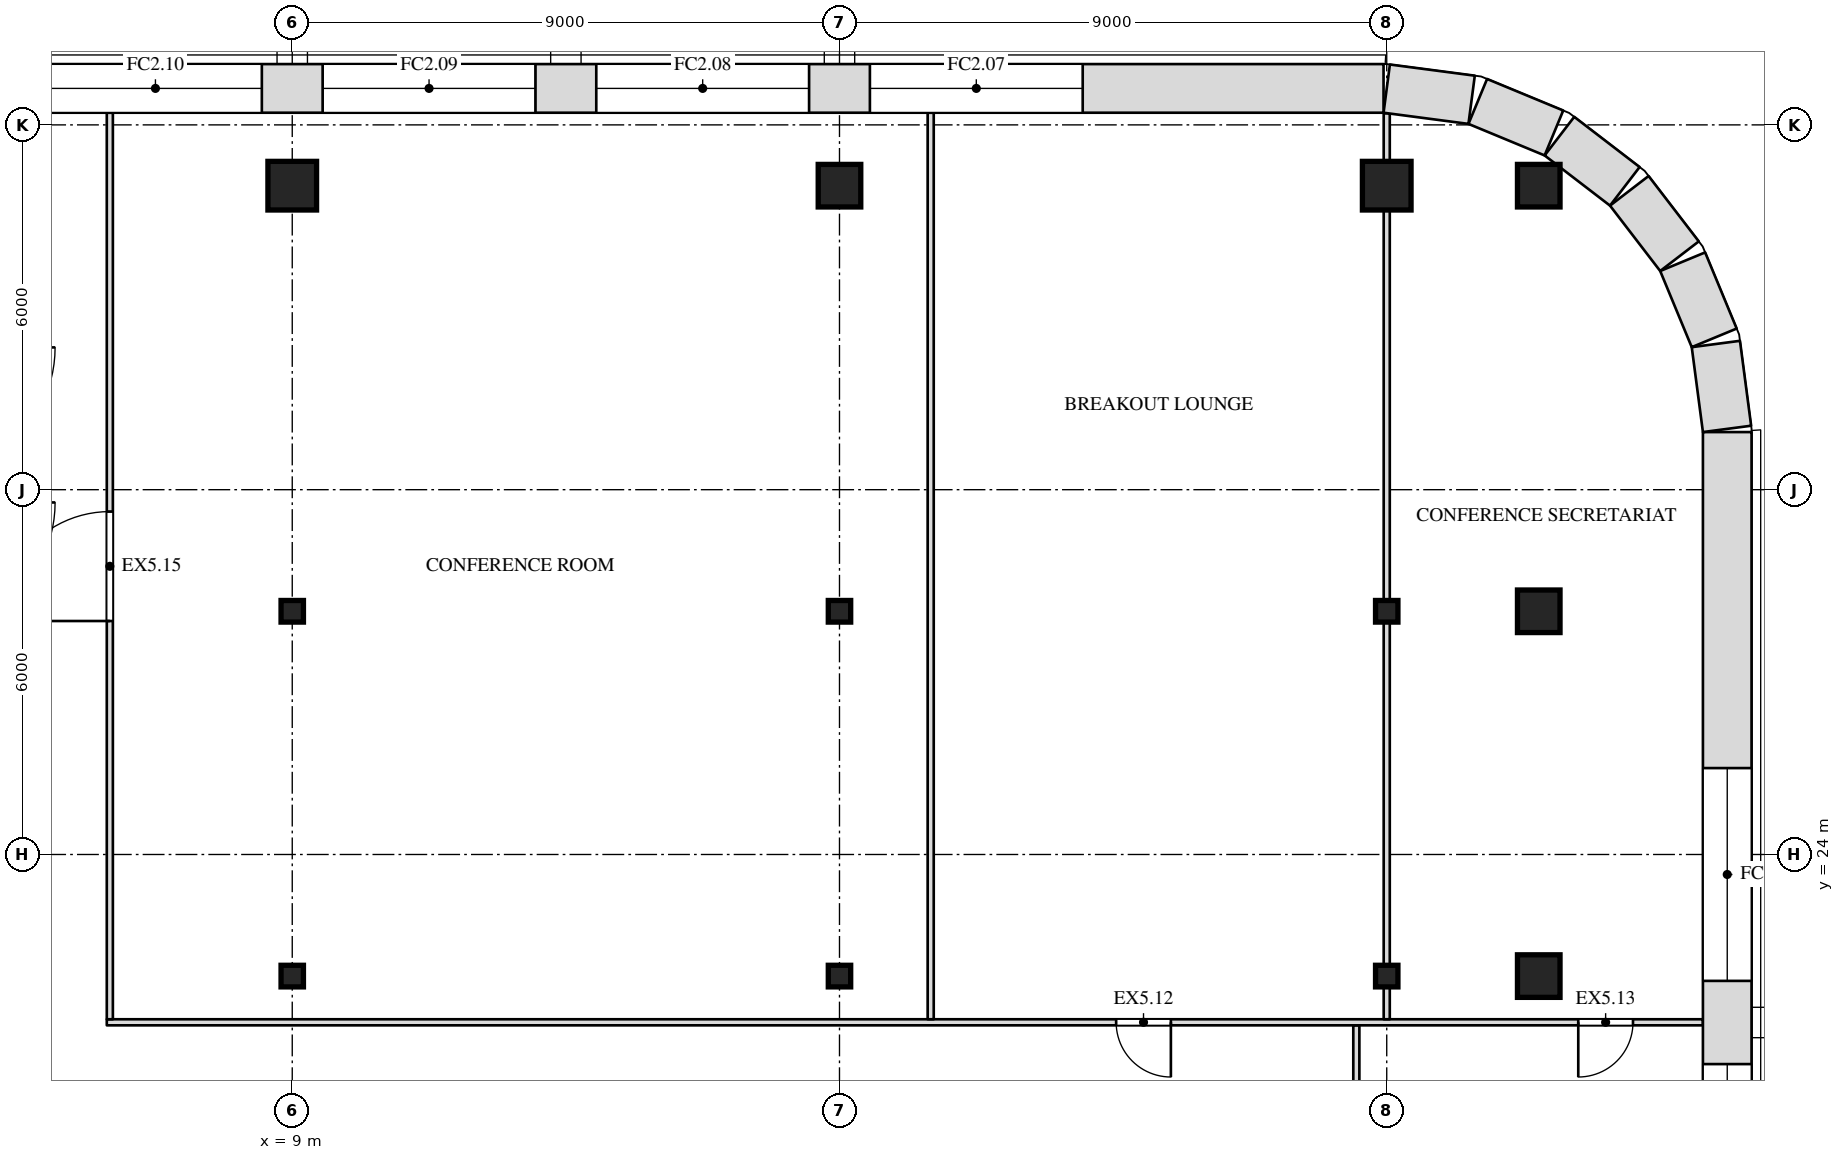
"""IFC4 building model, lengths in metres.
Left out: names, types, materials, properties, quantities, classifications, styles, units other than length and angle.
Written with IfcOpenShell. Run it as: python <this file> out.ifc"""

import sys

from ifc_helpers import new_model, si_unit, direction, frame, frame_2d, origin, origin_2d, place, context, subcontext, project, spatial, rectangle, i_section, extrude, element, fill, save


model = new_model("IFC4")
c1 = context("Model", 3, precision=1e-05, world=origin(), true_north=direction((0.0, 1.0)))
c2 = subcontext(c1, "Body", "Model", "MODEL_VIEW")
j1 = project(units=[si_unit("LENGTHUNIT", "METRE"), si_unit("PLANEANGLEUNIT", "RADIAN")], contexts=[c1])
p1 = place(None, origin())
s1 = spatial("IfcSite", under=j1, at=p1, CompositionType="ELEMENT")
p2 = place(p1, origin())
s2 = spatial("IfcBuilding", under=s1, at=p2, CompositionType="ELEMENT")
p3 = place(p2, frame((0.0, 0.0, 288.5)))
s3 = spatial("IfcBuildingStorey", under=s2, at=p3, CompositionType="ELEMENT", Elevation=288.5)
for number, where, z_axis, x_axis in (
    (1, (9.0, 22.0, 0.0), (0.0, 0.0, 1.0), (1.0, 0.0, 0.0)),
    (2, (18.0, 22.0, 0.0), (0.0, 0.0, 1.0), (1.0, 0.0, 0.0)),
    (3, (27.0, 22.0, 0.0), (0.0, 0.0, 1.0), (1.0, 0.0, 0.0)),
):
    element("IfcColumn", number, at=place(p3, frame(where, z_axis=z_axis, x_axis=x_axis)), inside=s3, PredefinedType="COLUMN", context=c2, shape_type="SweptSolid", body=[
        extrude(i_section(OverallWidth=0.368, OverallDepth=0.356, WebThickness=0.011, FlangeThickness=0.018, at=origin_2d()), origin(), (0.0, 0.0, 1.0), 4.0),
    ])
p4 = place(p3, frame((29.5, 22.0, 0.0), z_axis=(0.0, 0.0, 1.0), x_axis=(1.0, 0.0, 0.0)))
e4 = element("IfcColumn", 4, at=p4, inside=s3, PredefinedType="COLUMN", context=c2, shape_type="SweptSolid", body=[
    extrude(rectangle(XDim=0.7, YDim=0.7, at=origin_2d()), origin(), (0.0, 0.0, 1.0), 4.0),
])
for number, where, z_axis, x_axis in (
    (5, (9.0, 28.0, 0.0), (0.0, 0.0, 1.0), (1.0, 0.0, 0.0)),
    (6, (18.0, 28.0, 0.0), (0.0, 0.0, 1.0), (1.0, 0.0, 0.0)),
    (7, (27.0, 28.0, 0.0), (0.0, 0.0, 1.0), (1.0, 0.0, 0.0)),
):
    element("IfcColumn", number, at=place(p3, frame(where, z_axis=z_axis, x_axis=x_axis)), inside=s3, PredefinedType="COLUMN", context=c2, shape_type="SweptSolid", body=[
        extrude(i_section(OverallWidth=0.368, OverallDepth=0.356, WebThickness=0.011, FlangeThickness=0.018, at=origin_2d()), origin(), (0.0, 0.0, 1.0), 4.0),
    ])
p5 = place(p3, frame((29.5, 28.0, 0.0), z_axis=(0.0, 0.0, 1.0), x_axis=(1.0, 0.0, 0.0)))
e8 = element("IfcColumn", 8, at=p5, inside=s3, PredefinedType="COLUMN", context=c2, shape_type="SweptSolid", body=[
    extrude(rectangle(XDim=0.7, YDim=0.7, at=origin_2d()), origin(), (0.0, 0.0, 1.0), 4.0),
])
p6 = place(p3, frame((9.0, 35.0, 0.0), z_axis=(0.0, 0.0, 1.0), x_axis=(1.0, 0.0, 0.0)))
e9 = element("IfcColumn", 9, at=p6, inside=s3, PredefinedType="COLUMN", context=c2, shape_type="SweptSolid", body=[
    extrude(rectangle(XDim=0.8, YDim=0.8, at=origin_2d()), origin(), (0.0, 0.0, 1.0), 4.0),
])
p7 = place(p3, frame((18.0, 35.0, 0.0), z_axis=(0.0, 0.0, 1.0), x_axis=(1.0, 0.0, 0.0)))
e10 = element("IfcColumn", 10, at=p7, inside=s3, PredefinedType="COLUMN", context=c2, shape_type="SweptSolid", body=[
    extrude(rectangle(XDim=0.7, YDim=0.7, at=origin_2d()), origin(), (0.0, 0.0, 1.0), 4.0),
])
p8 = place(p3, frame((27.0, 35.0, 0.0), z_axis=(0.0, 0.0, 1.0), x_axis=(1.0, 0.0, 0.0)))
e11 = element("IfcColumn", 11, at=p8, inside=s3, PredefinedType="COLUMN", context=c2, shape_type="SweptSolid", body=[
    extrude(rectangle(XDim=0.8, YDim=0.8, at=origin_2d()), origin(), (0.0, 0.0, 1.0), 4.0),
])
p9 = place(p3, frame((29.5, 35.0, 0.0), z_axis=(0.0, 0.0, 1.0), x_axis=(1.0, 0.0, 0.0)))
e12 = element("IfcColumn", 12, at=p9, inside=s3, PredefinedType="COLUMN", context=c2, shape_type="SweptSolid", body=[
    extrude(rectangle(XDim=0.7, YDim=0.7, at=origin_2d()), origin(), (0.0, 0.0, 1.0), 4.0),
])
p10 = place(p3, frame((26.5, -2.0, 0.0), z_axis=(0.0, 0.0, 1.0), x_axis=(0.0, 1.0, 0.0)))
e13 = element("IfcWall", 13, at=p10, inside=s3, PredefinedType="PARTITIONING", context=c2, shape_type="SweptSolid", body=[
    extrude(rectangle(XDim=23.19, YDim=0.1, at=frame_2d((11.595, 0.0))), origin(), (0.0, 0.0, 1.0), 3.78),
])
p11 = place(p3, frame((5.95, 21.24, 0.0), z_axis=(0.0, 0.0, 1.0), x_axis=(1.0, 0.0, 0.0)))
e14 = element("IfcWall", 14, at=p11, inside=s3, PredefinedType="PARTITIONING", context=c2, shape_type="SweptSolid", body=[
    extrude(rectangle(XDim=26.25, YDim=0.1, at=frame_2d((13.125, 0.0))), origin(), (0.0, 0.0, 1.0), 3.78),
])
p12 = place(p11, frame((16.6, 0.0, 0.0)))
e15 = element("IfcOpeningElement", 15, at=p12, cuts=e14, PredefinedType="OPENING", context=c2, shape_type="SweptSolid", body=[
    extrude(rectangle(XDim=0.9, YDim=2.1, at=frame_2d((0.45, 1.05))), frame((0.0, 0.062, 0.0), z_axis=(0.0, -1.0, 0.0), x_axis=(1.0, 0.0, 0.0)), (0.0, 0.0, 1.0), 0.124),
])
p13 = place(p11, frame((24.2, 0.0, 0.0)))
e16 = element("IfcOpeningElement", 16, at=p13, cuts=e14, PredefinedType="OPENING", context=c2, shape_type="SweptSolid", body=[
    extrude(rectangle(XDim=0.9, YDim=2.1, at=frame_2d((0.45, 1.05))), frame((0.0, 0.062, 0.0), z_axis=(0.0, -1.0, 0.0), x_axis=(1.0, 0.0, 0.0)), (0.0, 0.0, 1.0), 0.124),
])
p14 = place(p3, frame((6.0, 21.29, 0.0), z_axis=(0.0, 0.0, 1.0), x_axis=(0.0, 1.0, 0.0)))
e17 = element("IfcWall", 17, at=p14, inside=s3, PredefinedType="PARTITIONING", context=c2, shape_type="SweptSolid", body=[
    extrude(rectangle(XDim=14.91, YDim=0.1, at=frame_2d((7.455, 0.0))), origin(), (0.0, 0.0, 1.0), 3.78),
])
p15 = place(p14, frame((6.55, 0.0, 0.0)))
e18 = element("IfcOpeningElement", 18, at=p15, cuts=e17, PredefinedType="OPENING", context=c2, shape_type="SweptSolid", body=[
    extrude(rectangle(XDim=1.8, YDim=2.1, at=frame_2d((0.9, 1.05))), frame((0.0, 0.062, 0.0), z_axis=(0.0, -1.0, 0.0), x_axis=(1.0, 0.0, 0.0)), (0.0, 0.0, 1.0), 0.124),
])
p16 = place(p3, frame((19.5, 21.29, 0.0), z_axis=(0.0, 0.0, 1.0), x_axis=(0.0, 1.0, 0.0)))
e19 = element("IfcWall", 19, at=p16, inside=s3, PredefinedType="PARTITIONING", context=c2, shape_type="SweptSolid", body=[
    extrude(rectangle(XDim=14.91, YDim=0.1, at=frame_2d((7.455, 0.0))), origin(), (0.0, 0.0, 1.0), 3.78),
])
p17 = place(p3, frame((27.0, 21.29, 0.0), z_axis=(0.0, 0.0, 1.0), x_axis=(0.0, 1.0, 0.0)))
e20 = element("IfcWall", 20, at=p17, inside=s3, PredefinedType="PARTITIONING", context=c2, shape_type="SweptSolid", body=[
    extrude(rectangle(XDim=0.532, YDim=0.1, at=frame_2d((0.266, 0.0))), origin(), (0.0, 0.0, 1.0), 3.247),
])
p18 = place(p3, frame((27.0, 22.178, 0.0), z_axis=(0.0, 0.0, 1.0), x_axis=(0.0, 1.0, 0.0)))
e21 = element("IfcWall", 21, at=p18, inside=s3, PredefinedType="PARTITIONING", context=c2, shape_type="SweptSolid", body=[
    extrude(rectangle(XDim=5.645, YDim=0.1, at=frame_2d((2.822, 0.0))), origin(), (0.0, 0.0, 1.0), 3.247),
])
p19 = place(p3, frame((27.0, 28.178, 0.0), z_axis=(0.0, 0.0, 1.0), x_axis=(0.0, 1.0, 0.0)))
e22 = element("IfcWall", 22, at=p19, inside=s3, PredefinedType="PARTITIONING", context=c2, shape_type="SweptSolid", body=[
    extrude(rectangle(XDim=6.422, YDim=0.1, at=frame_2d((3.211, 0.0))), origin(), (0.0, 0.0, 1.0), 3.247),
])
p20 = place(p3, frame((27.0, 35.4, 0.0), z_axis=(0.0, 0.0, 1.0), x_axis=(0.0, 1.0, 0.0)))
e23 = element("IfcWall", 23, at=p20, inside=s3, PredefinedType="PARTITIONING", context=c2, shape_type="SweptSolid", body=[
    extrude(rectangle(XDim=0.79, YDim=0.1, at=frame_2d((0.395, 0.0))), origin(), (0.0, 0.0, 1.0), 3.78),
])
p21 = place(p3, frame((32.6, -7.948, 0.0), z_axis=(0.0, 0.0, 1.0), x_axis=(0.0, 1.0, 0.0)))
e24 = element("IfcWall", 24, at=p21, inside=s3, PredefinedType="SOLIDWALL", context=c2, shape_type="SweptSolid", body=[
    extrude(rectangle(XDim=38.895, YDim=0.8, at=frame_2d((19.448, 0.0))), origin(), (0.0, 0.0, 1.0), 3.78),
])
p22 = place(p21, frame((5.526, 0.0, 1.0)))
e25 = element("IfcOpeningElement", 25, at=p22, cuts=e24, PredefinedType="OPENING", context=c2, shape_type="SweptSolid", body=[
    extrude(rectangle(XDim=3.5, YDim=2.5, at=frame_2d((1.75, 1.25))), frame((0.0, 0.412, 0.0), z_axis=(0.0, -1.0, 0.0), x_axis=(1.0, 0.0, 0.0)), (0.0, 0.0, 1.0), 0.824),
])
p23 = place(p21, frame((10.395, 0.0, 1.0)))
e26 = element("IfcOpeningElement", 26, at=p23, cuts=e24, PredefinedType="OPENING", context=c2, shape_type="SweptSolid", body=[
    extrude(rectangle(XDim=3.5, YDim=2.5, at=frame_2d((1.75, 1.25))), frame((0.0, 0.412, 0.0), z_axis=(0.0, -1.0, 0.0), x_axis=(1.0, 0.0, 0.0)), (0.0, 0.0, 1.0), 0.824),
])
p24 = place(p21, frame((15.263, 0.0, 1.0)))
e27 = element("IfcOpeningElement", 27, at=p24, cuts=e24, PredefinedType="OPENING", context=c2, shape_type="SweptSolid", body=[
    extrude(rectangle(XDim=3.5, YDim=2.5, at=frame_2d((1.75, 1.25))), frame((0.0, 0.412, 0.0), z_axis=(0.0, -1.0, 0.0), x_axis=(1.0, 0.0, 0.0)), (0.0, 0.0, 1.0), 0.824),
])
p25 = place(p21, frame((20.132, 0.0, 1.0)))
e28 = element("IfcOpeningElement", 28, at=p25, cuts=e24, PredefinedType="OPENING", context=c2, shape_type="SweptSolid", body=[
    extrude(rectangle(XDim=3.5, YDim=2.5, at=frame_2d((1.75, 1.25))), frame((0.0, 0.412, 0.0), z_axis=(0.0, -1.0, 0.0), x_axis=(1.0, 0.0, 0.0)), (0.0, 0.0, 1.0), 0.824),
])
p26 = place(p21, frame((25.0, 0.0, 1.0)))
e29 = element("IfcOpeningElement", 29, at=p26, cuts=e24, PredefinedType="OPENING", context=c2, shape_type="SweptSolid", body=[
    extrude(rectangle(XDim=3.5, YDim=2.5, at=frame_2d((1.75, 1.25))), frame((0.0, 0.412, 0.0), z_axis=(0.0, -1.0, 0.0), x_axis=(1.0, 0.0, 0.0)), (0.0, 0.0, 1.0), 0.824),
])
p27 = place(p21, frame((29.869, 0.0, 1.0)))
e30 = element("IfcOpeningElement", 30, at=p27, cuts=e24, PredefinedType="OPENING", context=c2, shape_type="SweptSolid", body=[
    extrude(rectangle(XDim=3.5, YDim=2.5, at=frame_2d((1.75, 1.25))), frame((0.0, 0.412, 0.0), z_axis=(0.0, -1.0, 0.0), x_axis=(1.0, 0.0, 0.0)), (0.0, 0.0, 1.0), 0.824),
])
p28 = place(p3, frame((32.597, 31.0, 0.0), z_axis=(0.0, 0.0, 1.0), x_axis=(-0.130517283865, 0.99144603414, 0.0)))
e31 = element("IfcWall", 31, at=p28, inside=s3, PredefinedType="SOLIDWALL", context=c2, shape_type="SweptSolid", body=[
    extrude(rectangle(XDim=1.408, YDim=0.8, at=frame_2d((0.704, 0.0))), origin(), (0.0, 0.0, 1.0), 3.78),
])
p29 = place(p3, frame((32.386, 32.497, 0.0), z_axis=(0.0, 0.0, 1.0), x_axis=(-0.38276009378, 0.923847774587, 0.0)))
e32 = element("IfcWall", 32, at=p29, inside=s3, PredefinedType="SOLIDWALL", context=c2, shape_type="SweptSolid", body=[
    extrude(rectangle(XDim=1.355, YDim=0.8, at=frame_2d((0.678, 0.0))), origin(), (0.0, 0.0, 1.0), 3.78),
])
for number, where, z_axis, x_axis in (
    (33, (31.815, 33.84, 0.0), (0.0, 0.0, 1.0), (-0.609, 0.793, 0.0)),
    (34, (30.916, 34.989, 0.0), (0.0, 0.0, 1.0), (-0.793, 0.609, 0.0)),
):
    element("IfcWall", number, at=place(p3, frame(where, z_axis=z_axis, x_axis=x_axis)), inside=s3, PredefinedType="SOLIDWALL", context=c2, shape_type="SweptSolid", body=[
        extrude(rectangle(XDim=1.356, YDim=0.8, at=frame_2d((0.678, 0.0))), origin(), (0.0, 0.0, 1.0), 3.78),
    ])
p30 = place(p3, frame((29.75, 35.867, 0.0), z_axis=(0.0, 0.0, 1.0), x_axis=(-0.923847774587, 0.38276009378, 0.0)))
e35 = element("IfcWall", 35, at=p30, inside=s3, PredefinedType="SOLIDWALL", context=c2, shape_type="SweptSolid", body=[
    extrude(rectangle(XDim=1.355, YDim=0.8, at=frame_2d((0.678, 0.0))), origin(), (0.0, 0.0, 1.0), 3.78),
])
p31 = place(p3, frame((28.396, 36.413, 0.0), z_axis=(0.0, 0.0, 1.0), x_axis=(-0.99144603414, 0.130517283865, 0.0)))
e36 = element("IfcWall", 36, at=p31, inside=s3, PredefinedType="SOLIDWALL", context=c2, shape_type="SweptSolid", body=[
    extrude(rectangle(XDim=1.408, YDim=0.8, at=frame_2d((0.704, 0.0))), origin(), (0.0, 0.0, 1.0), 3.78),
])
p32 = place(p3, frame((26.948, 36.6, 0.0), z_axis=(0.0, 0.0, 1.0), x_axis=(-1.0, 0.0, 0.0)))
e37 = element("IfcWall", 37, at=p32, inside=s3, PredefinedType="SOLIDWALL", context=c2, shape_type="SweptSolid", body=[
    extrude(rectangle(XDim=53.895, YDim=0.8, at=frame_2d((26.948, 0.0))), origin(), (0.0, 0.0, 1.0), 3.78),
])
p33 = place(p32, frame((4.948, 0.0, 1.0)))
e38 = element("IfcOpeningElement", 38, at=p33, cuts=e37, PredefinedType="OPENING", context=c2, shape_type="SweptSolid", body=[
    extrude(rectangle(XDim=3.5, YDim=2.5, at=frame_2d((1.75, 1.25))), frame((0.0, 0.412, 0.0), z_axis=(0.0, -1.0, 0.0), x_axis=(1.0, 0.0, 0.0)), (0.0, 0.0, 1.0), 0.824),
])
p34 = place(p32, frame((9.448, 0.0, 1.0)))
e39 = element("IfcOpeningElement", 39, at=p34, cuts=e37, PredefinedType="OPENING", context=c2, shape_type="SweptSolid", body=[
    extrude(rectangle(XDim=3.5, YDim=2.5, at=frame_2d((1.75, 1.25))), frame((0.0, 0.412, 0.0), z_axis=(0.0, -1.0, 0.0), x_axis=(1.0, 0.0, 0.0)), (0.0, 0.0, 1.0), 0.824),
])
p35 = place(p32, frame((13.948, 0.0, 1.0)))
e40 = element("IfcOpeningElement", 40, at=p35, cuts=e37, PredefinedType="OPENING", context=c2, shape_type="SweptSolid", body=[
    extrude(rectangle(XDim=3.5, YDim=2.5, at=frame_2d((1.75, 1.25))), frame((0.0, 0.412, 0.0), z_axis=(0.0, -1.0, 0.0), x_axis=(1.0, 0.0, 0.0)), (0.0, 0.0, 1.0), 0.824),
])
p36 = place(p32, frame((18.448, 0.0, 1.0)))
e41 = element("IfcOpeningElement", 41, at=p36, cuts=e37, PredefinedType="OPENING", context=c2, shape_type="SweptSolid", body=[
    extrude(rectangle(XDim=3.5, YDim=2.5, at=frame_2d((1.75, 1.25))), frame((0.0, 0.412, 0.0), z_axis=(0.0, -1.0, 0.0), x_axis=(1.0, 0.0, 0.0)), (0.0, 0.0, 1.0), 0.824),
])
p37 = place(p32, frame((22.948, 0.0, 1.0)))
e42 = element("IfcOpeningElement", 42, at=p37, cuts=e37, PredefinedType="OPENING", context=c2, shape_type="SweptSolid", body=[
    extrude(rectangle(XDim=3.5, YDim=2.5, at=frame_2d((1.75, 1.25))), frame((0.0, 0.412, 0.0), z_axis=(0.0, -1.0, 0.0), x_axis=(1.0, 0.0, 0.0)), (0.0, 0.0, 1.0), 0.824),
])
p38 = place(p32, frame((27.448, 0.0, 1.0)))
e43 = element("IfcOpeningElement", 43, at=p38, cuts=e37, PredefinedType="OPENING", context=c2, shape_type="SweptSolid", body=[
    extrude(rectangle(XDim=3.5, YDim=2.5, at=frame_2d((1.75, 1.25))), frame((0.0, 0.412, 0.0), z_axis=(0.0, -1.0, 0.0), x_axis=(1.0, 0.0, 0.0)), (0.0, 0.0, 1.0), 0.824),
])
p39 = place(p32, frame((31.948, 0.0, 1.0)))
e44 = element("IfcOpeningElement", 44, at=p39, cuts=e37, PredefinedType="OPENING", context=c2, shape_type="SweptSolid", body=[
    extrude(rectangle(XDim=3.5, YDim=2.5, at=frame_2d((1.75, 1.25))), frame((0.0, 0.412, 0.0), z_axis=(0.0, -1.0, 0.0), x_axis=(1.0, 0.0, 0.0)), (0.0, 0.0, 1.0), 0.824),
])
p40 = place(p32, frame((36.448, 0.0, 1.0)))
e45 = element("IfcOpeningElement", 45, at=p40, cuts=e37, PredefinedType="OPENING", context=c2, shape_type="SweptSolid", body=[
    extrude(rectangle(XDim=3.5, YDim=2.5, at=frame_2d((1.75, 1.25))), frame((0.0, 0.412, 0.0), z_axis=(0.0, -1.0, 0.0), x_axis=(1.0, 0.0, 0.0)), (0.0, 0.0, 1.0), 0.824),
])
p41 = place(p32, frame((40.948, 0.0, 1.0)))
e46 = element("IfcOpeningElement", 46, at=p41, cuts=e37, PredefinedType="OPENING", context=c2, shape_type="SweptSolid", body=[
    extrude(rectangle(XDim=3.5, YDim=2.5, at=frame_2d((1.75, 1.25))), frame((0.0, 0.412, 0.0), z_axis=(0.0, -1.0, 0.0), x_axis=(1.0, 0.0, 0.0)), (0.0, 0.0, 1.0), 0.824),
])
p42 = place(p32, frame((45.448, 0.0, 1.0)))
e47 = element("IfcOpeningElement", 47, at=p42, cuts=e37, PredefinedType="OPENING", context=c2, shape_type="SweptSolid", body=[
    extrude(rectangle(XDim=3.5, YDim=2.5, at=frame_2d((1.75, 1.25))), frame((0.0, 0.412, 0.0), z_axis=(0.0, -1.0, 0.0), x_axis=(1.0, 0.0, 0.0)), (0.0, 0.0, 1.0), 0.824),
])
p43 = place(p12, origin())
e48 = element("IfcDoor", 48, at=p43, inside=s3, OperationType="SINGLE_SWING_LEFT", PredefinedType="DOOR", context=c2, shape_type="SweptSolid", body=[
    extrude(rectangle(XDim=0.9, YDim=2.1, at=frame_2d((0.45, 1.05))), frame((0.0, 0.025, 0.0), z_axis=(0.0, -1.0, 0.0), x_axis=(1.0, 0.0, 0.0)), (0.0, 0.0, 1.0), 0.05),
])
fill(e15, e48)
p44 = place(p13, origin())
e49 = element("IfcDoor", 49, at=p44, inside=s3, OperationType="SINGLE_SWING_RIGHT", PredefinedType="DOOR", context=c2, shape_type="SweptSolid", body=[
    extrude(rectangle(XDim=0.9, YDim=2.1, at=frame_2d((0.45, 1.05))), frame((0.0, 0.025, 0.0), z_axis=(0.0, -1.0, 0.0), x_axis=(1.0, 0.0, 0.0)), (0.0, 0.0, 1.0), 0.05),
])
fill(e16, e49)
p45 = place(p15, origin())
e50 = element("IfcDoor", 50, at=p45, inside=s3, OperationType="DOUBLE_DOOR_SINGLE_SWING", PredefinedType="DOOR", context=c2, shape_type="SweptSolid", body=[
    extrude(rectangle(XDim=1.8, YDim=2.1, at=frame_2d((0.9, 1.05))), frame((0.0, 0.025, 0.0), z_axis=(0.0, -1.0, 0.0), x_axis=(1.0, 0.0, 0.0)), (0.0, 0.0, 1.0), 0.05),
])
fill(e18, e50)
p46 = place(p26, origin())
e51 = element("IfcWindow", 51, at=p46, inside=s3, PartitioningType="SINGLE_PANEL", PredefinedType="WINDOW", context=c2, shape_type="SweptSolid", body=[
    extrude(rectangle(XDim=3.5, YDim=2.5, at=frame_2d((1.75, 1.25))), frame((0.0, 0.03, 0.0), z_axis=(0.0, -1.0, 0.0), x_axis=(1.0, 0.0, 0.0)), (0.0, 0.0, 1.0), 0.06),
])
fill(e29, e51)
p47 = place(p27, origin())
e52 = element("IfcWindow", 52, at=p47, inside=s3, PartitioningType="SINGLE_PANEL", PredefinedType="WINDOW", context=c2, shape_type="SweptSolid", body=[
    extrude(rectangle(XDim=3.5, YDim=2.5, at=frame_2d((1.75, 1.25))), frame((0.0, 0.03, 0.0), z_axis=(0.0, -1.0, 0.0), x_axis=(1.0, 0.0, 0.0)), (0.0, 0.0, 1.0), 0.06),
])
fill(e30, e52)
p48 = place(p33, origin())
e53 = element("IfcWindow", 53, at=p48, inside=s3, PartitioningType="SINGLE_PANEL", PredefinedType="WINDOW", context=c2, shape_type="SweptSolid", body=[
    extrude(rectangle(XDim=3.5, YDim=2.5, at=frame_2d((1.75, 1.25))), frame((0.0, 0.03, 0.0), z_axis=(0.0, -1.0, 0.0), x_axis=(1.0, 0.0, 0.0)), (0.0, 0.0, 1.0), 0.06),
])
fill(e38, e53)
p49 = place(p34, origin())
e54 = element("IfcWindow", 54, at=p49, inside=s3, PartitioningType="SINGLE_PANEL", PredefinedType="WINDOW", context=c2, shape_type="SweptSolid", body=[
    extrude(rectangle(XDim=3.5, YDim=2.5, at=frame_2d((1.75, 1.25))), frame((0.0, 0.03, 0.0), z_axis=(0.0, -1.0, 0.0), x_axis=(1.0, 0.0, 0.0)), (0.0, 0.0, 1.0), 0.06),
])
fill(e39, e54)
p50 = place(p35, origin())
e55 = element("IfcWindow", 55, at=p50, inside=s3, PartitioningType="SINGLE_PANEL", PredefinedType="WINDOW", context=c2, shape_type="SweptSolid", body=[
    extrude(rectangle(XDim=3.5, YDim=2.5, at=frame_2d((1.75, 1.25))), frame((0.0, 0.03, 0.0), z_axis=(0.0, -1.0, 0.0), x_axis=(1.0, 0.0, 0.0)), (0.0, 0.0, 1.0), 0.06),
])
fill(e40, e55)
p51 = place(p36, origin())
e56 = element("IfcWindow", 56, at=p51, inside=s3, PartitioningType="SINGLE_PANEL", PredefinedType="WINDOW", context=c2, shape_type="SweptSolid", body=[
    extrude(rectangle(XDim=3.5, YDim=2.5, at=frame_2d((1.75, 1.25))), frame((0.0, 0.03, 0.0), z_axis=(0.0, -1.0, 0.0), x_axis=(1.0, 0.0, 0.0)), (0.0, 0.0, 1.0), 0.06),
])
fill(e41, e56)
save(model, sys.argv[1])
